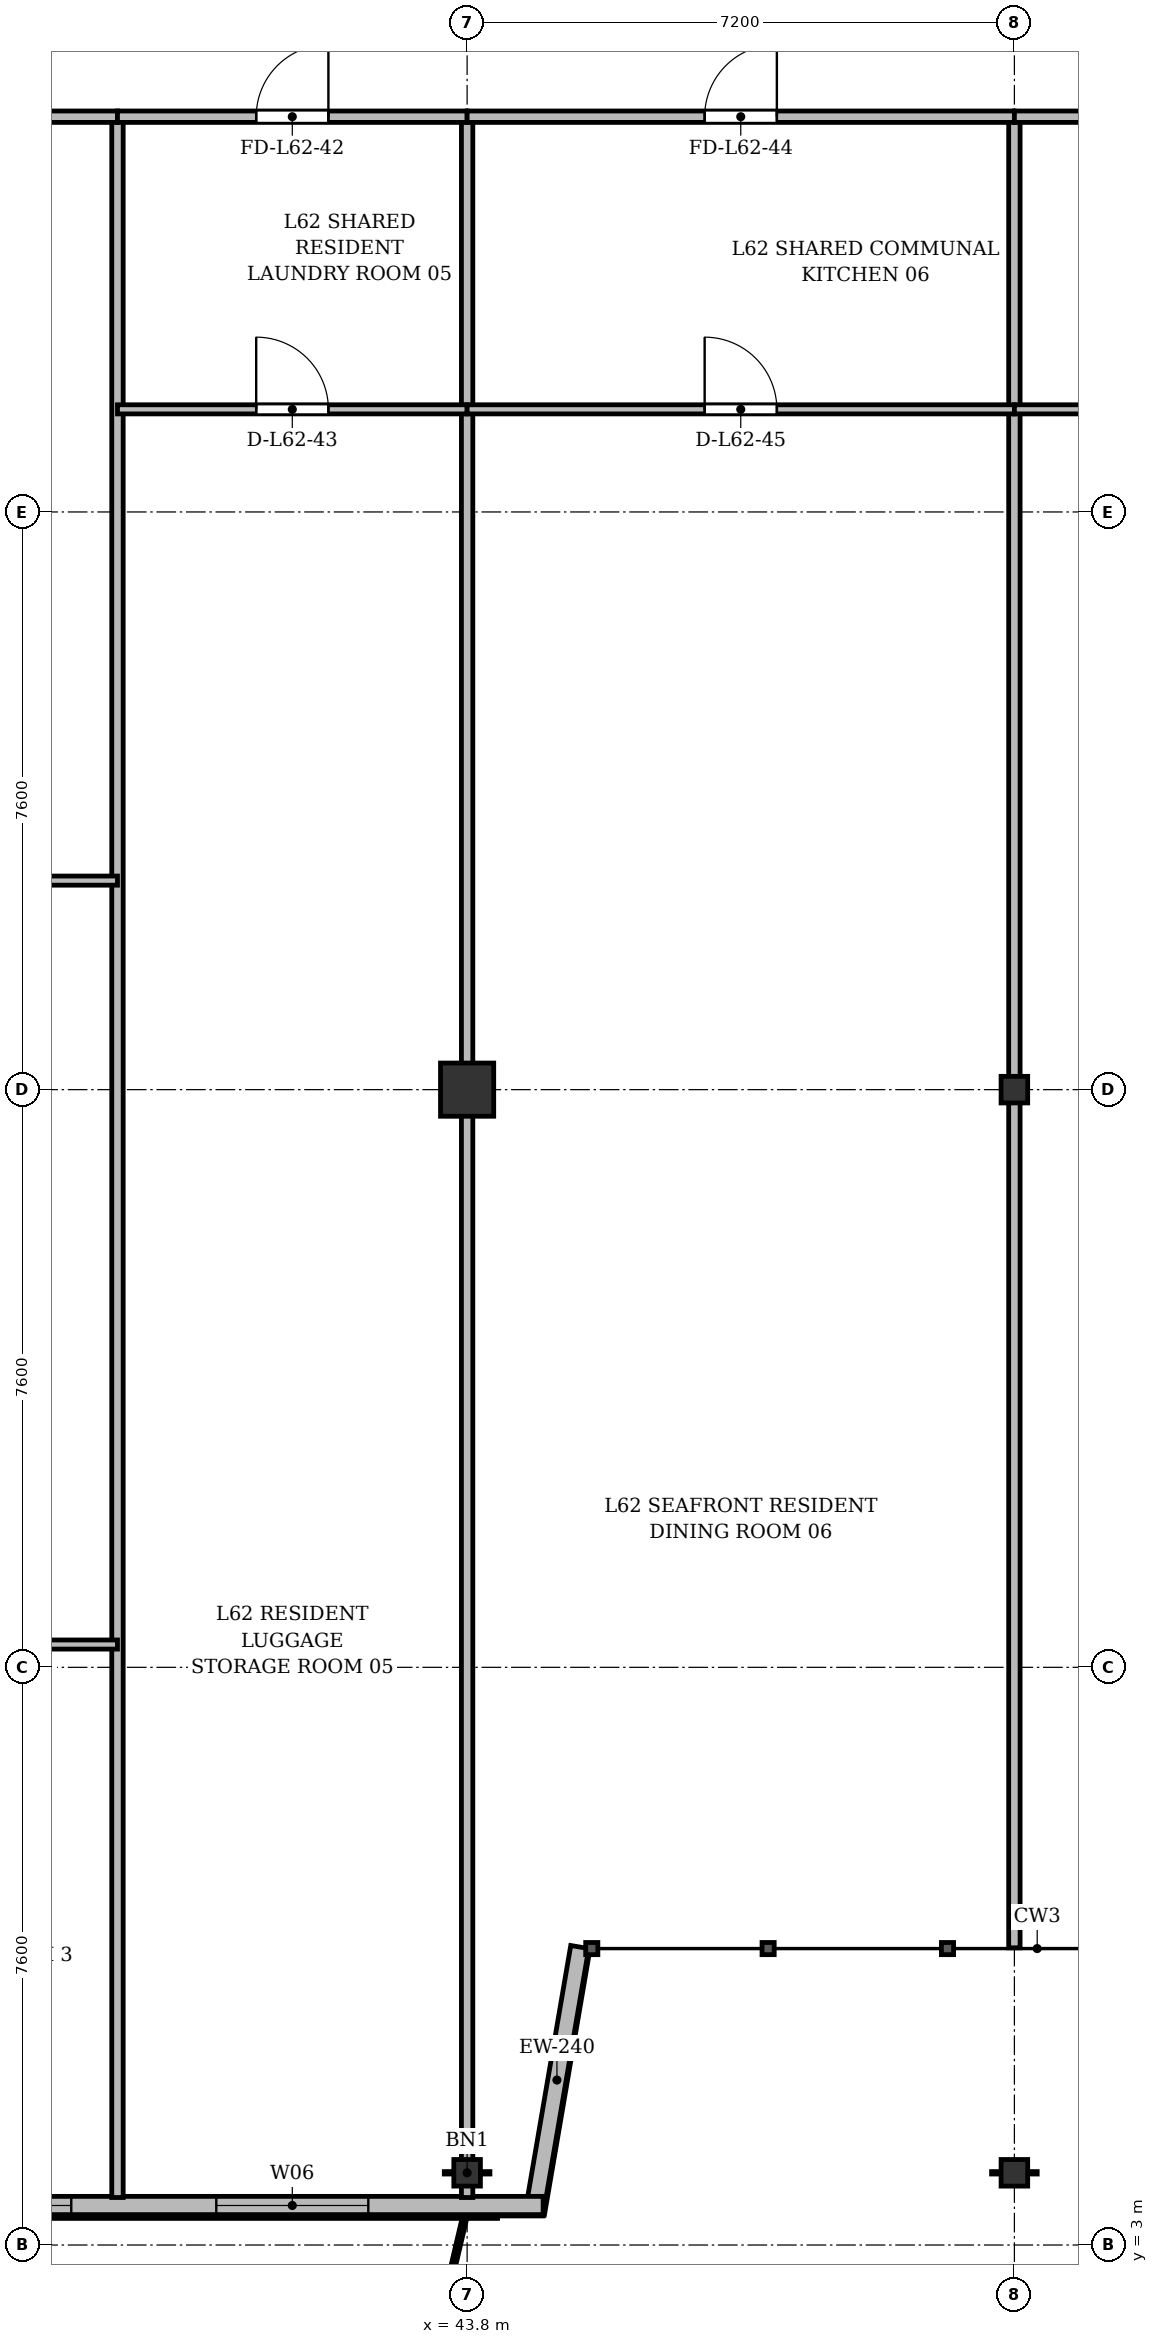
"""IFC4 building model, lengths in metres.
Left out: names, types, materials, properties, quantities, classifications, styles, units other than length and angle.
Written with IfcOpenShell. Run it as: python <this file> out.ifc"""

import sys

from ifc_helpers import new_model, si_unit, direction, frame, frame_2d, origin, origin_2d, place, context, subcontext, project, spatial, rectangle, i_section, extrude, source, transform, mapped, element, fill, save


model = new_model("IFC4")
c1 = context("Model", 3, precision=1e-05, world=origin(), true_north=direction((0.0, 1.0)))
c2 = subcontext(c1, "Body", "Model", "MODEL_VIEW")
j1 = project(units=[si_unit("LENGTHUNIT", "METRE"), si_unit("PLANEANGLEUNIT", "RADIAN")], contexts=[c1])
p1 = place(None, origin())
s1 = spatial("IfcSite", under=j1, at=p1, CompositionType="ELEMENT")
p2 = place(p1, origin())
s2 = spatial("IfcBuilding", under=s1, at=p2, CompositionType="ELEMENT")
p3 = place(p2, frame((0.0, 0.0, 237.3)))
s3 = spatial("IfcBuildingStorey", under=s2, at=p3, CompositionType="ELEMENT", Elevation=237.3)
m1 = source(origin(), c2, "Body", "SweptSolid", [
    extrude(i_section(OverallWidth=0.35, OverallDepth=0.35, WebThickness=0.018, FlangeThickness=0.028, at=origin_2d()), origin(), (0.0, 0.0, 1.0), 3.6),
])
p4 = place(p3, frame((43.8, 3.95, 0.0), z_axis=(0.0, 0.0, 1.0), x_axis=(1.0, 0.0, 0.0)))
e1 = element("IfcColumn", 1, at=p4, inside=s3, PredefinedType="COLUMN", context=c2, shape_type="MappedRepresentation", body=[
    mapped(m1, transform((0.0, 0.0, 0.0), x_axis=(1.0, 0.0, 0.0), y_axis=(0.0, 1.0, 0.0), z_axis=(0.0, 0.0, 1.0), scale=1.0)),
])
m2 = source(origin(), c2, "Body", "SweptSolid", [
    extrude(rectangle(XDim=0.7, YDim=0.7, at=origin_2d()), origin(), (0.0, 0.0, 1.0), 3.6),
])
p5 = place(p3, frame((43.8, 18.2, 0.0), z_axis=(0.0, 0.0, 1.0), x_axis=(1.0, 0.0, 0.0)))
e2 = element("IfcColumn", 2, at=p5, inside=s3, PredefinedType="COLUMN", context=c2, shape_type="MappedRepresentation", body=[
    mapped(m2, transform((0.0, 0.0, 0.0), x_axis=(1.0, 0.0, 0.0), y_axis=(0.0, 1.0, 0.0), z_axis=(0.0, 0.0, 1.0), scale=1.0)),
])
for number, where, z_axis, x_axis in (
    (3, (51.0, 3.95, 0.0), (0.0, 0.0, 1.0), (1.0, 0.0, 0.0)),
    (4, (51.0, 18.2, 0.0), (0.0, 0.0, 1.0), (1.0, 0.0, 0.0)),
):
    element("IfcColumn", number, at=place(p3, frame(where, z_axis=z_axis, x_axis=x_axis)), inside=s3, PredefinedType="COLUMN", context=c2, shape_type="MappedRepresentation", body=[
        mapped(m1, transform((0.0, 0.0, 0.0), x_axis=(1.0, 0.0, 0.0), y_axis=(0.0, 1.0, 0.0), z_axis=(0.0, 0.0, 1.0), scale=1.0)),
    ])
p6 = place(p3, frame((45.282, 6.92, 0.0), z_axis=(0.0, 0.0, 1.0), x_axis=(-0.168990530437, -0.98561767467, 0.0)))
e5 = element("IfcWall", 5, at=p6, inside=s3, PredefinedType="SOLIDWALL", context=c2, shape_type="SweptSolid", body=[
    extrude(rectangle(XDim=3.551, YDim=0.24, at=frame_2d((1.775, 0.0))), origin(), (0.0, 0.0, 1.0), 2.77),
])
p7 = place(p3, frame((44.8, 3.52, 0.0), z_axis=(0.0, 0.0, 1.0), x_axis=(-1.0, 0.0, 0.0)))
e6 = element("IfcWall", 6, at=p7, inside=s3, PredefinedType="SOLIDWALL", context=c2, shape_type="SweptSolid", body=[
    extrude(rectangle(XDim=33.8, YDim=0.24, at=frame_2d((16.9, 0.0))), origin(), (0.0, 0.0, 1.0), 3.22),
])
p8 = place(p7, frame((2.3, 0.0, 0.9)))
e7 = element("IfcOpeningElement", 7, at=p8, cuts=e6, PredefinedType="OPENING", context=c2, shape_type="SweptSolid", body=[
    extrude(rectangle(XDim=2.0, YDim=1.95, at=frame_2d((1.0, 0.975))), frame((0.0, 0.13, 0.0), z_axis=(0.0, -1.0, 0.0), x_axis=(1.0, 0.0, 0.0)), (0.0, 0.0, 1.0), 0.26),
])
p9 = place(p7, frame((6.208, 0.0, 0.9)))
e8 = element("IfcOpeningElement", 8, at=p9, cuts=e6, PredefinedType="OPENING", context=c2, shape_type="SweptSolid", body=[
    extrude(rectangle(XDim=1.65, YDim=1.85, at=frame_2d((0.825, 0.925))), frame((0.0, 0.13, 0.0), z_axis=(0.0, -1.0, 0.0), x_axis=(1.0, 0.0, 0.0)), (0.0, 0.0, 1.0), 0.26),
])
p10 = place(p7, frame((9.0, 0.0, 0.9)))
e9 = element("IfcOpeningElement", 9, at=p10, cuts=e6, PredefinedType="OPENING", context=c2, shape_type="SweptSolid", body=[
    extrude(rectangle(XDim=1.8, YDim=1.8, at=frame_2d((0.9, 0.9))), frame((0.0, 0.13, 0.0), z_axis=(0.0, -1.0, 0.0), x_axis=(1.0, 0.0, 0.0)), (0.0, 0.0, 1.0), 0.26),
])
p11 = place(p7, frame((11.666, 0.0, 0.9)))
e10 = element("IfcOpeningElement", 10, at=p11, cuts=e6, PredefinedType="OPENING", context=c2, shape_type="SweptSolid", body=[
    extrude(rectangle(XDim=2.2, YDim=1.8, at=frame_2d((1.1, 0.9))), frame((0.0, 0.13, 0.0), z_axis=(0.0, -1.0, 0.0), x_axis=(1.0, 0.0, 0.0)), (0.0, 0.0, 1.0), 0.26),
])
p12 = place(p7, frame((17.291, 0.0, 0.0)))
e11 = element("IfcOpeningElement", 11, at=p12, cuts=e6, PredefinedType="OPENING", context=c2, shape_type="SweptSolid", body=[
    extrude(rectangle(XDim=1.2, YDim=2.2, at=frame_2d((0.6, 1.1))), frame((0.0, 0.13, 0.0), z_axis=(0.0, -1.0, 0.0), x_axis=(1.0, 0.0, 0.0)), (0.0, 0.0, 1.0), 0.26),
])
p13 = place(p7, frame((22.35, 0.0, 0.9)))
e12 = element("IfcOpeningElement", 12, at=p13, cuts=e6, PredefinedType="OPENING", context=c2, shape_type="SweptSolid", body=[
    extrude(rectangle(XDim=2.0, YDim=1.95, at=frame_2d((1.0, 0.975))), frame((0.0, 0.13, 0.0), z_axis=(0.0, -1.0, 0.0), x_axis=(1.0, 0.0, 0.0)), (0.0, 0.0, 1.0), 0.26),
])
p14 = place(p7, frame((26.425, 0.0, 0.9)))
e13 = element("IfcOpeningElement", 13, at=p14, cuts=e6, PredefinedType="OPENING", context=c2, shape_type="SweptSolid", body=[
    extrude(rectangle(XDim=1.65, YDim=1.85, at=frame_2d((0.825, 0.925))), frame((0.0, 0.13, 0.0), z_axis=(0.0, -1.0, 0.0), x_axis=(1.0, 0.0, 0.0)), (0.0, 0.0, 1.0), 0.26),
])
p15 = place(p7, frame((30.555, 0.0, 0.9)))
e14 = element("IfcOpeningElement", 14, at=p15, cuts=e6, PredefinedType="OPENING", context=c2, shape_type="SweptSolid", body=[
    extrude(rectangle(XDim=1.8, YDim=1.8, at=frame_2d((0.9, 0.9))), frame((0.0, 0.13, 0.0), z_axis=(0.0, -1.0, 0.0), x_axis=(1.0, 0.0, 0.0)), (0.0, 0.0, 1.0), 0.26),
])
p16 = place(p3, frame((39.2, 3.625, 0.0), z_axis=(0.0, 0.0, 1.0), x_axis=(0.0, 1.0, 0.0)))
e15 = element("IfcWall", 15, at=p16, inside=s3, PredefinedType="PARTITIONING", context=c2, shape_type="SweptSolid", body=[
    extrude(rectangle(XDim=27.375, YDim=0.15, at=frame_2d((13.688, 0.0))), origin(), (0.0, 0.0, 1.0), 2.77),
])
p17 = place(p3, frame((43.8, 3.625, 0.0), z_axis=(0.0, 0.0, 1.0), x_axis=(0.0, 1.0, 0.0)))
e16 = element("IfcWall", 16, at=p17, inside=s3, PredefinedType="PARTITIONING", context=c2, shape_type="SweptSolid", body=[
    extrude(rectangle(XDim=27.375, YDim=0.15, at=frame_2d((13.688, 0.0))), origin(), (0.0, 0.0, 1.0), 2.72),
])
p18 = place(p3, frame((51.0, 6.91, 0.0), z_axis=(0.0, 0.0, 1.0), x_axis=(0.0, 1.0, 0.0)))
e17 = element("IfcWall", 17, at=p18, inside=s3, PredefinedType="PARTITIONING", context=c2, shape_type="SweptSolid", body=[
    extrude(rectangle(XDim=24.09, YDim=0.15, at=frame_2d((12.045, 0.0))), origin(), (0.0, 0.0, 1.0), 2.72),
])
p19 = place(p3, frame((30.6, 20.95, 0.0), z_axis=(0.0, 0.0, 1.0), x_axis=(1.0, 0.0, 0.0)))
e18 = element("IfcWall", 18, at=p19, inside=s3, PredefinedType="PARTITIONING", context=c2, shape_type="SweptSolid", body=[
    extrude(rectangle(XDim=8.6, YDim=0.12, at=frame_2d((4.3, 0.0))), origin(), (0.0, 0.0, 1.0), 2.72),
])
p20 = place(p19, frame((3.825, 0.0, 0.0)))
e19 = element("IfcOpeningElement", 19, at=p20, cuts=e18, PredefinedType="OPENING", context=c2, shape_type="SweptSolid", body=[
    extrude(rectangle(XDim=0.95, YDim=2.15, at=frame_2d((0.475, 1.075))), frame((0.0, 0.07, 0.0), z_axis=(0.0, -1.0, 0.0), x_axis=(1.0, 0.0, 0.0)), (0.0, 0.0, 1.0), 0.14),
])
p21 = place(p3, frame((30.6, 31.0, 0.0), z_axis=(0.0, 0.0, 1.0), x_axis=(1.0, 0.0, 0.0)))
e20 = element("IfcWall", 20, at=p21, inside=s3, PredefinedType="PARTITIONING", context=c2, shape_type="SweptSolid", body=[
    extrude(rectangle(XDim=8.6, YDim=0.15, at=frame_2d((4.3, 0.0))), origin(), (0.0, 0.0, 1.0), 2.72),
])
p22 = place(p21, frame((5.767, 0.0, 0.0)))
e21 = element("IfcOpeningElement", 21, at=p22, cuts=e20, PredefinedType="OPENING", context=c2, shape_type="SweptSolid", body=[
    extrude(rectangle(XDim=0.95, YDim=2.15, at=frame_2d((0.475, 1.075))), frame((0.0, 0.085, 0.0), z_axis=(0.0, -1.0, 0.0), x_axis=(1.0, 0.0, 0.0)), (0.0, 0.0, 1.0), 0.17),
])
p23 = place(p3, frame((36.333, 10.9, 0.0), z_axis=(0.0, 0.0, 1.0), x_axis=(1.0, 0.0, 0.0)))
e22 = element("IfcWall", 22, at=p23, inside=s3, PredefinedType="PARTITIONING", context=c2, shape_type="SweptSolid", body=[
    extrude(rectangle(XDim=2.867, YDim=0.12, at=frame_2d((1.434, 0.0))), origin(), (0.0, 0.0, 1.0), 3.22),
])
p24 = place(p23, frame((0.959, 0.0, 0.0)))
e23 = element("IfcOpeningElement", 23, at=p24, cuts=e22, PredefinedType="OPENING", context=c2, shape_type="SweptSolid", body=[
    extrude(rectangle(XDim=0.95, YDim=2.15, at=frame_2d((0.475, 1.075))), frame((0.0, 0.07, 0.0), z_axis=(0.0, -1.0, 0.0), x_axis=(1.0, 0.0, 0.0)), (0.0, 0.0, 1.0), 0.14),
])
p25 = place(p3, frame((39.2, 31.0, 0.0), z_axis=(0.0, 0.0, 1.0), x_axis=(1.0, 0.0, 0.0)))
e24 = element("IfcWall", 24, at=p25, inside=s3, PredefinedType="PARTITIONING", context=c2, shape_type="SweptSolid", body=[
    extrude(rectangle(XDim=4.6, YDim=0.15, at=frame_2d((2.3, 0.0))), origin(), (0.0, 0.0, 1.0), 2.72),
])
p26 = place(p25, frame((1.825, 0.0, 0.0)))
e25 = element("IfcOpeningElement", 25, at=p26, cuts=e24, PredefinedType="OPENING", context=c2, shape_type="SweptSolid", body=[
    extrude(rectangle(XDim=0.95, YDim=2.15, at=frame_2d((0.475, 1.075))), frame((0.0, 0.085, 0.0), z_axis=(0.0, -1.0, 0.0), x_axis=(1.0, 0.0, 0.0)), (0.0, 0.0, 1.0), 0.17),
])
p27 = place(p3, frame((39.2, 27.15, 0.0), z_axis=(0.0, 0.0, 1.0), x_axis=(1.0, 0.0, 0.0)))
e26 = element("IfcWall", 26, at=p27, inside=s3, PredefinedType="PARTITIONING", context=c2, shape_type="SweptSolid", body=[
    extrude(rectangle(XDim=4.6, YDim=0.12, at=frame_2d((2.3, 0.0))), origin(), (0.0, 0.0, 1.0), 2.72),
])
p28 = place(p27, frame((1.825, 0.0, 0.0)))
e27 = element("IfcOpeningElement", 27, at=p28, cuts=e26, PredefinedType="OPENING", context=c2, shape_type="SweptSolid", body=[
    extrude(rectangle(XDim=0.95, YDim=2.15, at=frame_2d((0.475, 1.075))), frame((0.0, 0.07, 0.0), z_axis=(0.0, -1.0, 0.0), x_axis=(1.0, 0.0, 0.0)), (0.0, 0.0, 1.0), 0.14),
])
p29 = place(p3, frame((43.8, 31.0, 0.0), z_axis=(0.0, 0.0, 1.0), x_axis=(1.0, 0.0, 0.0)))
e28 = element("IfcWall", 28, at=p29, inside=s3, PredefinedType="PARTITIONING", context=c2, shape_type="SweptSolid", body=[
    extrude(rectangle(XDim=7.2, YDim=0.15, at=frame_2d((3.6, 0.0))), origin(), (0.0, 0.0, 1.0), 2.72),
])
p30 = place(p29, frame((3.125, 0.0, 0.0)))
e29 = element("IfcOpeningElement", 29, at=p30, cuts=e28, PredefinedType="OPENING", context=c2, shape_type="SweptSolid", body=[
    extrude(rectangle(XDim=0.95, YDim=2.15, at=frame_2d((0.475, 1.075))), frame((0.0, 0.085, 0.0), z_axis=(0.0, -1.0, 0.0), x_axis=(1.0, 0.0, 0.0)), (0.0, 0.0, 1.0), 0.17),
])
p31 = place(p3, frame((43.8, 27.15, 0.0), z_axis=(0.0, 0.0, 1.0), x_axis=(1.0, 0.0, 0.0)))
e30 = element("IfcWall", 30, at=p31, inside=s3, PredefinedType="PARTITIONING", context=c2, shape_type="SweptSolid", body=[
    extrude(rectangle(XDim=7.2, YDim=0.12, at=frame_2d((3.6, 0.0))), origin(), (0.0, 0.0, 1.0), 2.72),
])
p32 = place(p31, frame((3.125, 0.0, 0.0)))
e31 = element("IfcOpeningElement", 31, at=p32, cuts=e30, PredefinedType="OPENING", context=c2, shape_type="SweptSolid", body=[
    extrude(rectangle(XDim=0.95, YDim=2.15, at=frame_2d((0.475, 1.075))), frame((0.0, 0.07, 0.0), z_axis=(0.0, -1.0, 0.0), x_axis=(1.0, 0.0, 0.0)), (0.0, 0.0, 1.0), 0.14),
])
p33 = place(p3, frame((51.0, 31.0, 0.0), z_axis=(0.0, 0.0, 1.0), x_axis=(1.0, 0.0, 0.0)))
e32 = element("IfcWall", 32, at=p33, inside=s3, PredefinedType="PARTITIONING", context=c2, shape_type="SweptSolid", body=[
    extrude(rectangle(XDim=7.8, YDim=0.15, at=frame_2d((3.9, 0.0))), origin(), (0.0, 0.0, 1.0), 2.72),
])
p34 = place(p33, frame((3.333, 0.0, 0.0)))
e33 = element("IfcOpeningElement", 33, at=p34, cuts=e32, PredefinedType="OPENING", context=c2, shape_type="SweptSolid", body=[
    extrude(rectangle(XDim=0.95, YDim=2.15, at=frame_2d((0.475, 1.075))), frame((0.0, 0.085, 0.0), z_axis=(0.0, -1.0, 0.0), x_axis=(1.0, 0.0, 0.0)), (0.0, 0.0, 1.0), 0.17),
])
p35 = place(p3, frame((51.0, 27.15, 0.0), z_axis=(0.0, 0.0, 1.0), x_axis=(1.0, 0.0, 0.0)))
e34 = element("IfcWall", 34, at=p35, inside=s3, PredefinedType="PARTITIONING", context=c2, shape_type="SweptSolid", body=[
    extrude(rectangle(XDim=7.8, YDim=0.12, at=frame_2d((3.9, 0.0))), origin(), (0.0, 0.0, 1.0), 2.72),
])
p36 = place(p35, frame((3.333, 0.0, 0.0)))
e35 = element("IfcOpeningElement", 35, at=p36, cuts=e34, PredefinedType="OPENING", context=c2, shape_type="SweptSolid", body=[
    extrude(rectangle(XDim=0.95, YDim=2.15, at=frame_2d((0.475, 1.075))), frame((0.0, 0.07, 0.0), z_axis=(0.0, -1.0, 0.0), x_axis=(1.0, 0.0, 0.0)), (0.0, 0.0, 1.0), 0.14),
])
m3 = source(origin(), c2, "Body", "SweptSolid", [
    extrude(rectangle(XDim=2.0, YDim=1.95, at=frame_2d((1.0, 0.975))), frame((0.0, 0.03, 0.0), z_axis=(0.0, -1.0, 0.0), x_axis=(1.0, 0.0, 0.0)), (0.0, 0.0, 1.0), 0.06),
])
p37 = place(p8, origin())
e36 = element("IfcWindow", 36, at=p37, inside=s3, PartitioningType="SINGLE_PANEL", PredefinedType="WINDOW", context=c2, shape_type="MappedRepresentation", body=[
    mapped(m3, transform((0.0, 0.0, 0.0), x_axis=(1.0, 0.0, 0.0), y_axis=(0.0, 1.0, 0.0), z_axis=(0.0, 0.0, 1.0), scale=1.0)),
])
fill(e7, e36)
m4 = source(origin(), c2, "Body", "SweptSolid", [
    extrude(rectangle(XDim=1.65, YDim=1.85, at=frame_2d((0.825, 0.925))), frame((0.0, 0.03, 0.0), z_axis=(0.0, -1.0, 0.0), x_axis=(1.0, 0.0, 0.0)), (0.0, 0.0, 1.0), 0.06),
])
p38 = place(p9, origin())
e37 = element("IfcWindow", 37, at=p38, inside=s3, PartitioningType="SINGLE_PANEL", PredefinedType="WINDOW", context=c2, shape_type="MappedRepresentation", body=[
    mapped(m4, transform((0.0, 0.0, 0.0), x_axis=(1.0, 0.0, 0.0), y_axis=(0.0, 1.0, 0.0), z_axis=(0.0, 0.0, 1.0), scale=1.0)),
])
fill(e8, e37)
m5 = source(origin(), c2, "Body", "SweptSolid", [
    extrude(rectangle(XDim=0.95, YDim=2.15, at=frame_2d((0.475, 1.075))), frame((0.0, 0.025, 0.0), z_axis=(0.0, -1.0, 0.0), x_axis=(1.0, 0.0, 0.0)), (0.0, 0.0, 1.0), 0.05),
])
p39 = place(p26, origin())
e38 = element("IfcDoor", 38, at=p39, inside=s3, OperationType="SINGLE_SWING_RIGHT", PredefinedType="DOOR", context=c2, shape_type="MappedRepresentation", body=[
    mapped(m5, transform((0.0, 0.0, 0.0), x_axis=(1.0, 0.0, 0.0), y_axis=(0.0, 1.0, 0.0), z_axis=(0.0, 0.0, 1.0), scale=1.0)),
])
fill(e25, e38)
p40 = place(p28, origin())
e39 = element("IfcDoor", 39, at=p40, inside=s3, OperationType="SINGLE_SWING_LEFT", PredefinedType="DOOR", context=c2, shape_type="MappedRepresentation", body=[
    mapped(m5, transform((0.0, 0.0, 0.0), x_axis=(1.0, 0.0, 0.0), y_axis=(0.0, 1.0, 0.0), z_axis=(0.0, 0.0, 1.0), scale=1.0)),
])
fill(e27, e39)
p41 = place(p30, origin())
e40 = element("IfcDoor", 40, at=p41, inside=s3, OperationType="SINGLE_SWING_RIGHT", PredefinedType="DOOR", context=c2, shape_type="MappedRepresentation", body=[
    mapped(m5, transform((0.0, 0.0, 0.0), x_axis=(1.0, 0.0, 0.0), y_axis=(0.0, 1.0, 0.0), z_axis=(0.0, 0.0, 1.0), scale=1.0)),
])
fill(e29, e40)
p42 = place(p32, origin())
e41 = element("IfcDoor", 41, at=p42, inside=s3, OperationType="SINGLE_SWING_LEFT", PredefinedType="DOOR", context=c2, shape_type="MappedRepresentation", body=[
    mapped(m5, transform((0.0, 0.0, 0.0), x_axis=(1.0, 0.0, 0.0), y_axis=(0.0, 1.0, 0.0), z_axis=(0.0, 0.0, 1.0), scale=1.0)),
])
fill(e31, e41)
save(model, sys.argv[1])
